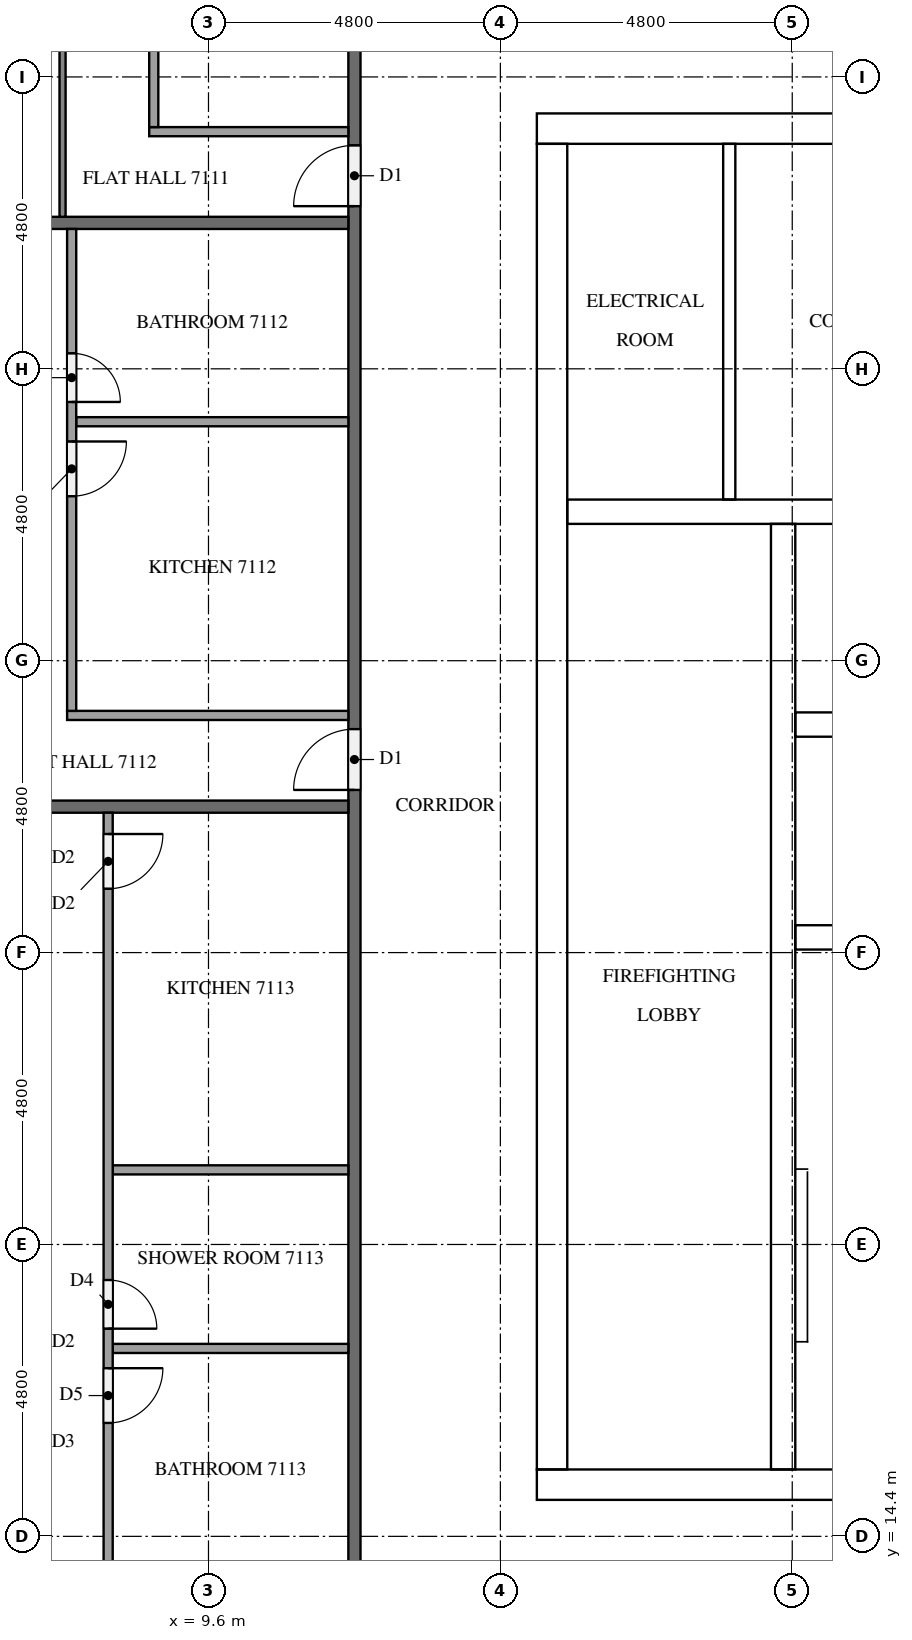
"""IFC4 building model, lengths in metres.
Left out: names, types, materials, properties, quantities, classifications, styles, units other than length and angle.
Written with IfcOpenShell. Run it as: python <this file> out.ifc"""

import sys

from ifc_helpers import new_model, si_unit, direction, frame, frame_2d, origin, place, context, subcontext, project, spatial, rectangle, extrude, element, fill, save


model = new_model("IFC4")
c1 = context("Model", 3, precision=1e-05, world=origin(), true_north=direction((0.0, 1.0)))
c2 = subcontext(c1, "Body", "Model", "MODEL_VIEW")
j1 = project(units=[si_unit("LENGTHUNIT", "METRE"), si_unit("PLANEANGLEUNIT", "RADIAN")], contexts=[c1])
p1 = place(None, origin())
s1 = spatial("IfcSite", under=j1, at=p1, CompositionType="ELEMENT")
p2 = place(p1, origin())
s2 = spatial("IfcBuilding", under=s1, at=p2, CompositionType="ELEMENT")
p3 = place(p2, frame((0.0, 0.0, 272.1)))
s3 = spatial("IfcBuildingStorey", under=s2, at=p3, CompositionType="ELEMENT", Elevation=272.1)
p4 = place(p3, frame((15.0, 15.25, 0.0), z_axis=(0.0, 0.0, 1.0), x_axis=(1.0, 0.0, 0.0)))
e1 = element("IfcWall", 1, at=p4, inside=s3, PredefinedType="SHEAR", context=c2, shape_type="SweptSolid", body=[
    extrude(rectangle(XDim=32.4, YDim=0.5, at=frame_2d((16.2, 0.0))), origin(), (0.0, 0.0, 1.0), 3.2),
])
p5 = place(p4, frame((15.3, 0.0, 0.0)))
e2 = element("IfcOpeningElement", 2, at=p5, cuts=e1, PredefinedType="OPENING", context=c2, shape_type="SweptSolid", body=[
    extrude(rectangle(XDim=1.8, YDim=2.1, at=frame_2d((0.9, 1.05))), frame((0.0, 0.26, 0.0), z_axis=(0.0, -1.0, 0.0), x_axis=(1.0, 0.0, 0.0)), (0.0, 0.0, 1.0), 0.52),
])
p6 = place(p3, frame((15.0, 37.55, 0.0), z_axis=(0.0, 0.0, 1.0), x_axis=(1.0, 0.0, 0.0)))
e3 = element("IfcWall", 3, at=p6, inside=s3, PredefinedType="SHEAR", context=c2, shape_type="SweptSolid", body=[
    extrude(rectangle(XDim=32.4, YDim=0.5, at=frame_2d((16.2, 0.0))), origin(), (0.0, 0.0, 1.0), 3.2),
])
p7 = place(p6, frame((15.3, 0.0, 0.0)))
e4 = element("IfcOpeningElement", 4, at=p7, cuts=e3, PredefinedType="OPENING", context=c2, shape_type="SweptSolid", body=[
    extrude(rectangle(XDim=1.8, YDim=2.1, at=frame_2d((0.9, 1.05))), frame((0.0, 0.26, 0.0), z_axis=(0.0, -1.0, 0.0), x_axis=(1.0, 0.0, 0.0)), (0.0, 0.0, 1.0), 0.52),
])
p8 = place(p6, frame((1.282, 0.0, 0.0)))
e5 = element("IfcOpeningElement", 5, at=p8, cuts=e3, PredefinedType="OPENING", context=c2, shape_type="SweptSolid", body=[
    extrude(rectangle(XDim=1.0, YDim=2.1, at=frame_2d((0.5, 1.05))), frame((0.0, 0.26, 0.0), z_axis=(0.0, -1.0, 0.0), x_axis=(1.0, 0.0, 0.0)), (0.0, 0.0, 1.0), 0.52),
])
p9 = place(p6, frame((5.082, 0.0, 0.0)))
e6 = element("IfcOpeningElement", 6, at=p9, cuts=e3, PredefinedType="OPENING", context=c2, shape_type="SweptSolid", body=[
    extrude(rectangle(XDim=1.0, YDim=2.1, at=frame_2d((0.5, 1.05))), frame((0.0, 0.26, 0.0), z_axis=(0.0, -1.0, 0.0), x_axis=(1.0, 0.0, 0.0)), (0.0, 0.0, 1.0), 0.52),
])
p10 = place(p3, frame((15.25, 15.5, 0.0), z_axis=(0.0, 0.0, 1.0), x_axis=(0.0, 1.0, 0.0)))
e7 = element("IfcWall", 7, at=p10, inside=s3, PredefinedType="SHEAR", context=c2, shape_type="SweptSolid", body=[
    extrude(rectangle(XDim=21.8, YDim=0.5, at=frame_2d((10.9, 0.0))), origin(), (0.0, 0.0, 1.0), 3.2),
])
p11 = place(p10, frame((5.26, 0.0, 0.0)))
e8 = element("IfcOpeningElement", 8, at=p11, cuts=e7, PredefinedType="OPENING", context=c2, shape_type="SweptSolid", body=[
    extrude(rectangle(XDim=1.2, YDim=2.1, at=frame_2d((0.6, 1.05))), frame((0.0, 0.26, 0.0), z_axis=(0.0, -1.0, 0.0), x_axis=(1.0, 0.0, 0.0)), (0.0, 0.0, 1.0), 0.52),
])
p12 = place(p3, frame((19.05, 15.5, 0.0), z_axis=(0.0, 0.0, 1.0), x_axis=(0.0, 1.0, 0.0)))
e9 = element("IfcWall", 9, at=p12, inside=s3, PredefinedType="SHEAR", context=c2, shape_type="SweptSolid", body=[
    extrude(rectangle(XDim=15.55, YDim=0.4, at=frame_2d((7.775, 0.0))), origin(), (0.0, 0.0, 1.0), 3.2),
])
p13 = place(p12, frame((9.95, 0.0, 0.0)))
e10 = element("IfcOpeningElement", 10, at=p13, cuts=e9, PredefinedType="OPENING", context=c2, shape_type="SweptSolid", body=[
    extrude(rectangle(XDim=1.1, YDim=2.1, at=frame_2d((0.55, 1.05))), frame((0.0, 0.21, 0.0), z_axis=(0.0, -1.0, 0.0), x_axis=(1.0, 0.0, 0.0)), (0.0, 0.0, 1.0), 0.42),
])
p14 = place(p12, frame((13.45, 0.0, 0.0)))
e11 = element("IfcOpeningElement", 11, at=p14, cuts=e9, PredefinedType="OPENING", context=c2, shape_type="SweptSolid", body=[
    extrude(rectangle(XDim=1.1, YDim=2.1, at=frame_2d((0.55, 1.05))), frame((0.0, 0.21, 0.0), z_axis=(0.0, -1.0, 0.0), x_axis=(1.0, 0.0, 0.0)), (0.0, 0.0, 1.0), 0.42),
])
p15 = place(p12, frame((0.7, 0.0, 0.0)))
e12 = element("IfcOpeningElement", 12, at=p15, cuts=e9, PredefinedType="OPENING", context=c2, shape_type="SweptSolid", body=[
    extrude(rectangle(XDim=1.2, YDim=2.1, at=frame_2d((0.6, 1.05))), frame((0.0, 0.21, 0.0), z_axis=(0.0, -1.0, 0.0), x_axis=(1.0, 0.0, 0.0)), (0.0, 0.0, 1.0), 0.42),
])
for number, where, z_axis, x_axis in (
    (13, (19.25, 24.25, 0.0), (0.0, 0.0, 1.0), (1.0, 0.0, 0.0)),
    (14, (19.25, 27.75, 0.0), (0.0, 0.0, 1.0), (1.0, 0.0, 0.0)),
):
    element("IfcWall", number, at=place(p3, frame(where, z_axis=z_axis, x_axis=x_axis)), inside=s3, PredefinedType="SHEAR", context=c2, shape_type="SweptSolid", body=[
        extrude(rectangle(XDim=3.65, YDim=0.4, at=frame_2d((1.825, 0.0))), origin(), (0.0, 0.0, 1.0), 3.2),
    ])
p16 = place(p3, frame((15.5, 31.25, 0.0), z_axis=(0.0, 0.0, 1.0), x_axis=(1.0, 0.0, 0.0)))
e15 = element("IfcWall", 15, at=p16, inside=s3, PredefinedType="SHEAR", context=c2, shape_type="SweptSolid", body=[
    extrude(rectangle(XDim=7.4, YDim=0.4, at=frame_2d((3.7, 0.0))), origin(), (0.0, 0.0, 1.0), 3.2),
])
p17 = place(p3, frame((18.164, 31.45, 0.0), z_axis=(0.0, 0.0, 1.0), x_axis=(0.0, 1.0, 0.0)))
e16 = element("IfcWall", 16, at=p17, inside=s3, PredefinedType="PARTITIONING", context=c2, shape_type="SweptSolid", body=[
    extrude(rectangle(XDim=5.85, YDim=0.2, at=frame_2d((2.925, 0.0))), origin(), (0.0, 0.0, 1.0), 3.2),
])
p18 = place(p3, frame((12.0, 12.1, 0.0), z_axis=(0.0, 0.0, 1.0), x_axis=(0.0, 1.0, 0.0)))
e17 = element("IfcWall", 17, at=p18, inside=s3, PredefinedType="PARTITIONING", context=c2, shape_type="SweptSolid", body=[
    extrude(rectangle(XDim=28.6, YDim=0.2, at=frame_2d((14.3, 0.0))), origin(), (0.0, 0.0, 1.0), 3.2),
])
p19 = place(p18, frame((24.175, 0.0, 0.0)))
e18 = element("IfcOpeningElement", 18, at=p19, cuts=e17, PredefinedType="OPENING", context=c2, shape_type="SweptSolid", body=[
    extrude(rectangle(XDim=1.0, YDim=2.1, at=frame_2d((0.5, 1.05))), frame((0.0, 0.11, 0.0), z_axis=(0.0, -1.0, 0.0), x_axis=(1.0, 0.0, 0.0)), (0.0, 0.0, 1.0), 0.22),
])
p20 = place(p18, frame((14.575, 0.0, 0.0)))
e19 = element("IfcOpeningElement", 19, at=p20, cuts=e17, PredefinedType="OPENING", context=c2, shape_type="SweptSolid", body=[
    extrude(rectangle(XDim=1.0, YDim=2.1, at=frame_2d((0.5, 1.05))), frame((0.0, 0.11, 0.0), z_axis=(0.0, -1.0, 0.0), x_axis=(1.0, 0.0, 0.0)), (0.0, 0.0, 1.0), 0.22),
])
p21 = place(p18, frame((0.175, 0.0, 0.0)))
e20 = element("IfcOpeningElement", 20, at=p21, cuts=e17, PredefinedType="OPENING", context=c2, shape_type="SweptSolid", body=[
    extrude(rectangle(XDim=1.0, YDim=2.1, at=frame_2d((0.5, 1.05))), frame((0.0, 0.11, 0.0), z_axis=(0.0, -1.0, 0.0), x_axis=(1.0, 0.0, 0.0)), (0.0, 0.0, 1.0), 0.22),
])
for number, where, z_axis, x_axis in (
    (21, (0.1, 36.0, 0.0), (0.0, 0.0, 1.0), (1.0, 0.0, 0.0)),
    (22, (0.1, 26.4, 0.0), (0.0, 0.0, 1.0), (1.0, 0.0, 0.0)),
):
    element("IfcWall", number, at=place(p3, frame(where, z_axis=z_axis, x_axis=x_axis)), inside=s3, PredefinedType="PARTITIONING", context=c2, shape_type="SweptSolid", body=[
        extrude(rectangle(XDim=11.8, YDim=0.2, at=frame_2d((5.9, 0.0))), origin(), (0.0, 0.0, 1.0), 3.2),
    ])
p22 = place(p3, frame((7.2, 36.1, 0.0), z_axis=(0.0, 0.0, 1.0), x_axis=(0.0, 1.0, 0.0)))
e23 = element("IfcWall", 23, at=p22, inside=s3, PredefinedType="PARTITIONING", context=c2, shape_type="SweptSolid", body=[
    extrude(rectangle(XDim=11.8, YDim=0.1, at=frame_2d((5.9, 0.0))), origin(), (0.0, 0.0, 1.0), 3.2),
])
p23 = place(p22, frame((5.75, 0.0, 0.0)))
e24 = element("IfcOpeningElement", 24, at=p23, cuts=e23, PredefinedType="OPENING", context=c2, shape_type="SweptSolid", body=[
    extrude(rectangle(XDim=1.0, YDim=2.1, at=frame_2d((0.5, 1.05))), frame((0.0, 0.06, 0.0), z_axis=(0.0, -1.0, 0.0), x_axis=(1.0, 0.0, 0.0)), (0.0, 0.0, 1.0), 0.12),
])
p24 = place(p22, frame((7.45, 0.0, 0.0)))
e25 = element("IfcOpeningElement", 25, at=p24, cuts=e23, PredefinedType="OPENING", context=c2, shape_type="SweptSolid", body=[
    extrude(rectangle(XDim=0.9, YDim=2.1, at=frame_2d((0.45, 1.05))), frame((0.0, 0.06, 0.0), z_axis=(0.0, -1.0, 0.0), x_axis=(1.0, 0.0, 0.0)), (0.0, 0.0, 1.0), 0.12),
])
p25 = place(p3, frame((11.9, 37.5, 0.0), z_axis=(0.0, 0.0, 1.0), x_axis=(-1.0, 0.0, 0.0)))
e26 = element("IfcWall", 26, at=p25, inside=s3, PredefinedType="PARTITIONING", context=c2, shape_type="SweptSolid", body=[
    extrude(rectangle(XDim=3.275, YDim=0.15, at=frame_2d((1.637, 0.0))), origin(), (0.0, 0.0, 1.0), 3.2),
])
p26 = place(p3, frame((8.7, 47.9, 0.0), z_axis=(0.0, 0.0, 1.0), x_axis=(0.0, -1.0, 0.0)))
e27 = element("IfcWall", 27, at=p26, inside=s3, PredefinedType="PARTITIONING", context=c2, shape_type="SweptSolid", body=[
    extrude(rectangle(XDim=10.325, YDim=0.15, at=frame_2d((5.163, 0.0))), origin(), (0.0, 0.0, 1.0), 3.2),
])
p27 = place(p26, frame((6.52, 0.0, 0.0)))
e28 = element("IfcOpeningElement", 28, at=p27, cuts=e27, PredefinedType="OPENING", context=c2, shape_type="SweptSolid", body=[
    extrude(rectangle(XDim=0.8, YDim=2.1, at=frame_2d((0.4, 1.05))), frame((0.0, 0.085, 0.0), z_axis=(0.0, -1.0, 0.0), x_axis=(1.0, 0.0, 0.0)), (0.0, 0.0, 1.0), 0.17),
])
p28 = place(p26, frame((4.97, 0.0, 0.0)))
e29 = element("IfcOpeningElement", 29, at=p28, cuts=e27, PredefinedType="OPENING", context=c2, shape_type="SweptSolid", body=[
    extrude(rectangle(XDim=0.9, YDim=2.1, at=frame_2d((0.45, 1.05))), frame((0.0, 0.085, 0.0), z_axis=(0.0, -1.0, 0.0), x_axis=(1.0, 0.0, 0.0)), (0.0, 0.0, 1.0), 0.17),
])
p29 = place(p3, frame((11.9, 32.73, 0.0), z_axis=(0.0, 0.0, 1.0), x_axis=(-1.0, 0.0, 0.0)))
e30 = element("IfcWall", 30, at=p29, inside=s3, PredefinedType="PARTITIONING", context=c2, shape_type="SweptSolid", body=[
    extrude(rectangle(XDim=4.475, YDim=0.15, at=frame_2d((2.237, 0.0))), origin(), (0.0, 0.0, 1.0), 3.2),
])
p30 = place(p3, frame((11.9, 27.9, 0.0), z_axis=(0.0, 0.0, 1.0), x_axis=(-1.0, 0.0, 0.0)))
e31 = element("IfcWall", 31, at=p30, inside=s3, PredefinedType="PARTITIONING", context=c2, shape_type="SweptSolid", body=[
    extrude(rectangle(XDim=4.625, YDim=0.15, at=frame_2d((2.312, 0.0))), origin(), (0.0, 0.0, 1.0), 3.2),
])
p31 = place(p3, frame((7.35, 35.9, 0.0), z_axis=(0.0, 0.0, 1.0), x_axis=(0.0, -1.0, 0.0)))
e32 = element("IfcWall", 32, at=p31, inside=s3, PredefinedType="PARTITIONING", context=c2, shape_type="SweptSolid", body=[
    extrude(rectangle(XDim=7.925, YDim=0.15, at=frame_2d((3.962, 0.0))), origin(), (0.0, 0.0, 1.0), 3.2),
])
p32 = place(p31, frame((3.495, 0.0, 0.0)))
e33 = element("IfcOpeningElement", 33, at=p32, cuts=e32, PredefinedType="OPENING", context=c2, shape_type="SweptSolid", body=[
    extrude(rectangle(XDim=0.9, YDim=2.1, at=frame_2d((0.45, 1.05))), frame((0.0, 0.085, 0.0), z_axis=(0.0, -1.0, 0.0), x_axis=(1.0, 0.0, 0.0)), (0.0, 0.0, 1.0), 0.17),
])
p33 = place(p31, frame((2.045, 0.0, 0.0)))
e34 = element("IfcOpeningElement", 34, at=p33, cuts=e32, PredefinedType="OPENING", context=c2, shape_type="SweptSolid", body=[
    extrude(rectangle(XDim=0.8, YDim=2.1, at=frame_2d((0.4, 1.05))), frame((0.0, 0.085, 0.0), z_axis=(0.0, -1.0, 0.0), x_axis=(1.0, 0.0, 0.0)), (0.0, 0.0, 1.0), 0.17),
])
for number, where, z_axis, x_axis in (
    (35, (11.9, 17.49, 0.0), (0.0, 0.0, 1.0), (-1.0, 0.0, 0.0)),
    (36, (11.9, 20.427, 0.0), (0.0, 0.0, 1.0), (-1.0, 0.0, 0.0)),
):
    element("IfcWall", number, at=place(p3, frame(where, z_axis=z_axis, x_axis=x_axis)), inside=s3, PredefinedType="PARTITIONING", context=c2, shape_type="SweptSolid", body=[
        extrude(rectangle(XDim=3.875, YDim=0.15, at=frame_2d((1.938, 0.0))), origin(), (0.0, 0.0, 1.0), 3.2),
    ])
p34 = place(p3, frame((7.95, 26.3, 0.0), z_axis=(0.0, 0.0, 1.0), x_axis=(0.0, -1.0, 0.0)))
e37 = element("IfcWall", 37, at=p34, inside=s3, PredefinedType="PARTITIONING", context=c2, shape_type="SweptSolid", body=[
    extrude(rectangle(XDim=12.725, YDim=0.15, at=frame_2d((6.363, 0.0))), origin(), (0.0, 0.0, 1.0), 3.2),
])
p35 = place(p34, frame((9.135, 0.0, 0.0)))
e38 = element("IfcOpeningElement", 38, at=p35, cuts=e37, PredefinedType="OPENING", context=c2, shape_type="SweptSolid", body=[
    extrude(rectangle(XDim=0.9, YDim=2.1, at=frame_2d((0.45, 1.05))), frame((0.0, 0.085, 0.0), z_axis=(0.0, -1.0, 0.0), x_axis=(1.0, 0.0, 0.0)), (0.0, 0.0, 1.0), 0.17),
])
p36 = place(p34, frame((7.685, 0.0, 0.0)))
e39 = element("IfcOpeningElement", 39, at=p36, cuts=e37, PredefinedType="OPENING", context=c2, shape_type="SweptSolid", body=[
    extrude(rectangle(XDim=0.8, YDim=2.1, at=frame_2d((0.4, 1.05))), frame((0.0, 0.085, 0.0), z_axis=(0.0, -1.0, 0.0), x_axis=(1.0, 0.0, 0.0)), (0.0, 0.0, 1.0), 0.17),
])
p37 = place(p34, frame((0.35, 0.0, 0.0)))
e40 = element("IfcOpeningElement", 40, at=p37, cuts=e37, PredefinedType="OPENING", context=c2, shape_type="SweptSolid", body=[
    extrude(rectangle(XDim=0.9, YDim=2.1, at=frame_2d((0.45, 1.05))), frame((0.0, 0.085, 0.0), z_axis=(0.0, -1.0, 0.0), x_axis=(1.0, 0.0, 0.0)), (0.0, 0.0, 1.0), 0.17),
])
p38 = place(p13, origin())
e41 = element("IfcDoor", 41, at=p38, inside=s3, OperationType="DOUBLE_DOOR_SLIDING", PredefinedType="DOOR", context=c2, shape_type="SweptSolid", body=[
    extrude(rectangle(XDim=1.1, YDim=2.1, at=frame_2d((0.55, 1.05))), frame((0.0, 0.025, 0.0), z_axis=(0.0, -1.0, 0.0), x_axis=(1.0, 0.0, 0.0)), (0.0, 0.0, 1.0), 0.05),
])
fill(e10, e41)
p39 = place(p14, origin())
e42 = element("IfcDoor", 42, at=p39, inside=s3, OperationType="DOUBLE_DOOR_SLIDING", PredefinedType="DOOR", context=c2, shape_type="SweptSolid", body=[
    extrude(rectangle(XDim=1.1, YDim=2.1, at=frame_2d((0.55, 1.05))), frame((0.0, 0.025, 0.0), z_axis=(0.0, -1.0, 0.0), x_axis=(1.0, 0.0, 0.0)), (0.0, 0.0, 1.0), 0.05),
])
fill(e11, e42)
p40 = place(p15, frame((1.2, 0.0, 0.0), z_axis=(0.0, 0.0, 1.0), x_axis=(-1.0, 0.0, 0.0)))
e43 = element("IfcDoor", 43, at=p40, inside=s3, OperationType="SINGLE_SWING_LEFT", PredefinedType="DOOR", context=c2, shape_type="SweptSolid", body=[
    extrude(rectangle(XDim=1.2, YDim=2.1, at=frame_2d((0.6, 1.05))), frame((0.0, 0.025, 0.0), z_axis=(0.0, -1.0, 0.0), x_axis=(1.0, 0.0, 0.0)), (0.0, 0.0, 1.0), 0.05),
])
fill(e12, e43)
p41 = place(p11, frame((1.2, 0.0, 0.0), z_axis=(0.0, 0.0, 1.0), x_axis=(-1.0, 0.0, 0.0)))
e44 = element("IfcDoor", 44, at=p41, inside=s3, OperationType="SINGLE_SWING_RIGHT", PredefinedType="DOOR", context=c2, shape_type="SweptSolid", body=[
    extrude(rectangle(XDim=1.2, YDim=2.1, at=frame_2d((0.6, 1.05))), frame((0.0, 0.025, 0.0), z_axis=(0.0, -1.0, 0.0), x_axis=(1.0, 0.0, 0.0)), (0.0, 0.0, 1.0), 0.05),
])
fill(e8, e44)
p42 = place(p8, origin())
e45 = element("IfcDoor", 45, at=p42, inside=s3, OperationType="SINGLE_SWING_RIGHT", PredefinedType="DOOR", context=c2, shape_type="SweptSolid", body=[
    extrude(rectangle(XDim=1.0, YDim=2.1, at=frame_2d((0.5, 1.05))), frame((0.0, 0.025, 0.0), z_axis=(0.0, -1.0, 0.0), x_axis=(1.0, 0.0, 0.0)), (0.0, 0.0, 1.0), 0.05),
])
fill(e5, e45)
p43 = place(p19, origin())
e46 = element("IfcDoor", 46, at=p43, inside=s3, OperationType="SINGLE_SWING_LEFT", PredefinedType="DOOR", context=c2, shape_type="SweptSolid", body=[
    extrude(rectangle(XDim=1.0, YDim=2.1, at=frame_2d((0.5, 1.05))), frame((0.0, 0.025, 0.0), z_axis=(0.0, -1.0, 0.0), x_axis=(1.0, 0.0, 0.0)), (0.0, 0.0, 1.0), 0.05),
])
fill(e18, e46)
p44 = place(p20, origin())
e47 = element("IfcDoor", 47, at=p44, inside=s3, OperationType="SINGLE_SWING_LEFT", PredefinedType="DOOR", context=c2, shape_type="SweptSolid", body=[
    extrude(rectangle(XDim=1.0, YDim=2.1, at=frame_2d((0.5, 1.05))), frame((0.0, 0.025, 0.0), z_axis=(0.0, -1.0, 0.0), x_axis=(1.0, 0.0, 0.0)), (0.0, 0.0, 1.0), 0.05),
])
fill(e19, e47)
p45 = place(p32, origin())
e48 = element("IfcDoor", 48, at=p45, inside=s3, OperationType="SINGLE_SWING_LEFT", PredefinedType="DOOR", context=c2, shape_type="SweptSolid", body=[
    extrude(rectangle(XDim=0.9, YDim=2.1, at=frame_2d((0.45, 1.05))), frame((0.0, 0.025, 0.0), z_axis=(0.0, -1.0, 0.0), x_axis=(1.0, 0.0, 0.0)), (0.0, 0.0, 1.0), 0.05),
])
fill(e33, e48)
p46 = place(p33, origin())
e49 = element("IfcDoor", 49, at=p46, inside=s3, OperationType="SINGLE_SWING_RIGHT", PredefinedType="DOOR", context=c2, shape_type="SweptSolid", body=[
    extrude(rectangle(XDim=0.8, YDim=2.1, at=frame_2d((0.4, 1.05))), frame((0.0, 0.025, 0.0), z_axis=(0.0, -1.0, 0.0), x_axis=(1.0, 0.0, 0.0)), (0.0, 0.0, 1.0), 0.05),
])
fill(e34, e49)
p47 = place(p35, origin())
e50 = element("IfcDoor", 50, at=p47, inside=s3, OperationType="SINGLE_SWING_LEFT", PredefinedType="DOOR", context=c2, shape_type="SweptSolid", body=[
    extrude(rectangle(XDim=0.9, YDim=2.1, at=frame_2d((0.45, 1.05))), frame((0.0, 0.025, 0.0), z_axis=(0.0, -1.0, 0.0), x_axis=(1.0, 0.0, 0.0)), (0.0, 0.0, 1.0), 0.05),
])
fill(e38, e50)
p48 = place(p36, origin())
e51 = element("IfcDoor", 51, at=p48, inside=s3, OperationType="SINGLE_SWING_RIGHT", PredefinedType="DOOR", context=c2, shape_type="SweptSolid", body=[
    extrude(rectangle(XDim=0.8, YDim=2.1, at=frame_2d((0.4, 1.05))), frame((0.0, 0.025, 0.0), z_axis=(0.0, -1.0, 0.0), x_axis=(1.0, 0.0, 0.0)), (0.0, 0.0, 1.0), 0.05),
])
fill(e39, e51)
p49 = place(p37, origin())
e52 = element("IfcDoor", 52, at=p49, inside=s3, OperationType="SINGLE_SWING_LEFT", PredefinedType="DOOR", context=c2, shape_type="SweptSolid", body=[
    extrude(rectangle(XDim=0.9, YDim=2.1, at=frame_2d((0.45, 1.05))), frame((0.0, 0.025, 0.0), z_axis=(0.0, -1.0, 0.0), x_axis=(1.0, 0.0, 0.0)), (0.0, 0.0, 1.0), 0.05),
])
fill(e40, e52)
save(model, sys.argv[1])
